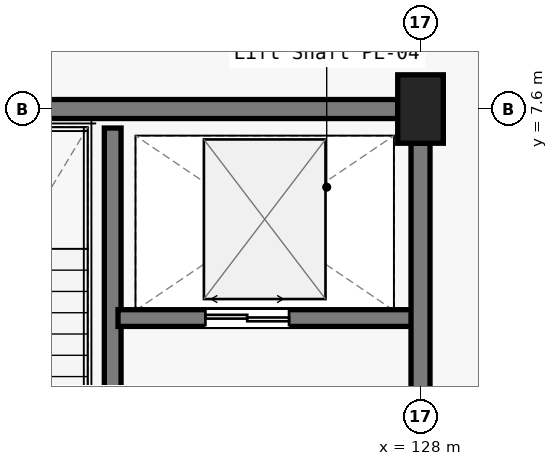
"""IFC4 building model, lengths in metres.
Left out: names, types, materials, properties, quantities, classifications, styles, units other than length and angle.
Written with IfcOpenShell. Run it as: python <this file> out.ifc"""

import sys

from ifc_helpers import new_model, si_unit, direction, frame, frame_2d, origin, origin_2d, place, context, subcontext, project, spatial, rectangle, extrude, element, fill, save


model = new_model("IFC4")
c1 = context("Model", 3, precision=1e-05, world=origin(), true_north=direction((0.0, 1.0)))
c2 = subcontext(c1, "Body", "Model", "MODEL_VIEW")
j1 = project(units=[si_unit("LENGTHUNIT", "METRE"), si_unit("PLANEANGLEUNIT", "RADIAN")], contexts=[c1])
p1 = place(None, origin())
s1 = spatial("IfcSite", under=j1, at=p1, CompositionType="ELEMENT")
p2 = place(p1, origin())
s2 = spatial("IfcBuilding", under=s1, at=p2, CompositionType="ELEMENT")
p3 = place(p2, origin())
s3 = spatial("IfcBuildingStorey", under=s2, at=p3, CompositionType="ELEMENT", Elevation=0.0)
p4 = place(p3, frame((128.0, 7.6, 0.0), z_axis=(0.0, 0.0, 1.0), x_axis=(1.0, 0.0, 0.0)))
e1 = element("IfcColumn", 1, at=p4, inside=s3, PredefinedType="COLUMN", context=c2, shape_type="SweptSolid", body=[
    extrude(rectangle(XDim=0.6, YDim=0.9, at=origin_2d()), origin(), (0.0, 0.0, 1.0), 5.4),
])
p5 = place(p3, frame((120.35, 7.6, 0.0), z_axis=(0.0, 0.0, 1.0), x_axis=(1.0, 0.0, 0.0)))
e2 = element("IfcWall", 2, at=p5, inside=s3, PredefinedType="SOLIDWALL", context=c2, shape_type="SweptSolid", body=[
    extrude(rectangle(XDim=7.35, YDim=0.25, at=frame_2d((3.675, 0.0))), origin(), (0.0, 0.0, 1.0), 3.29),
])
p6 = place(p3, frame((123.95, 0.25, 0.0), z_axis=(0.0, 0.0, 1.0), x_axis=(0.0, 1.0, 0.0)))
e3 = element("IfcWall", 3, at=p6, inside=s3, PredefinedType="SOLIDWALL", context=c2, shape_type="SweptSolid", body=[
    extrude(rectangle(XDim=7.1, YDim=0.22, at=frame_2d((3.55, 0.0))), origin(), (0.0, 0.0, 1.0), 5.1),
])
p7 = place(p6, frame((0.35, 0.0, 0.0)))
e4 = element("IfcOpeningElement", 4, at=p7, cuts=e3, PredefinedType="OPENING", context=c2, shape_type="SweptSolid", body=[
    extrude(rectangle(XDim=1.2, YDim=2.15, at=frame_2d((0.6, 1.075))), frame((0.0, 0.12, 0.0), z_axis=(0.0, -1.0, 0.0), x_axis=(1.0, 0.0, 0.0)), (0.0, 0.0, 1.0), 0.24),
])
p8 = place(p3, frame((124.02, 4.85, 0.0), z_axis=(0.0, 0.0, 1.0), x_axis=(1.0, 0.0, 0.0)))
e5 = element("IfcWall", 5, at=p8, inside=s3, PredefinedType="SOLIDWALL", context=c2, shape_type="SweptSolid", body=[
    extrude(rectangle(XDim=3.93, YDim=0.22, at=frame_2d((1.965, 0.0))), origin(), (0.0, 0.0, 1.0), 4.4),
])
p9 = place(p8, frame((1.15, 0.0, 0.0)))
e6 = element("IfcOpeningElement", 6, at=p9, cuts=e5, PredefinedType="OPENING", context=c2, shape_type="SweptSolid", body=[
    extrude(rectangle(XDim=1.1, YDim=2.2, at=frame_2d((0.55, 1.1))), frame((0.0, 0.12, 0.0), z_axis=(0.0, -1.0, 0.0), x_axis=(1.0, 0.0, 0.0)), (0.0, 0.0, 1.0), 0.24),
])
p10 = place(p3, frame((128.0, 0.35, 0.0), z_axis=(0.0, 0.0, 1.0), x_axis=(0.0, 1.0, 0.0)))
e7 = element("IfcWall", 7, at=p10, inside=s3, PredefinedType="SOLIDWALL", context=c2, shape_type="SweptSolid", body=[
    extrude(rectangle(XDim=6.8, YDim=0.25, at=frame_2d((3.4, 0.0))), origin(), (0.0, 0.0, 1.0), 4.325),
])
p11 = place(p10, frame((2.0, 0.0, 0.0)))
e8 = element("IfcOpeningElement", 8, at=p11, cuts=e7, PredefinedType="OPENING", context=c2, shape_type="SweptSolid", body=[
    extrude(rectangle(XDim=1.35, YDim=2.2, at=frame_2d((0.675, 1.1))), frame((0.0, 0.135, 0.0), z_axis=(0.0, -1.0, 0.0), x_axis=(1.0, 0.0, 0.0)), (0.0, 0.0, 1.0), 0.27),
])
p12 = place(p9, origin())
e9 = element("IfcDoor", 9, at=p12, inside=s3, OperationType="DOUBLE_DOOR_SLIDING", PredefinedType="DOOR", context=c2, shape_type="SweptSolid", body=[
    extrude(rectangle(XDim=1.1, YDim=2.2, at=frame_2d((0.55, 1.1))), frame((0.0, 0.025, 0.0), z_axis=(0.0, -1.0, 0.0), x_axis=(1.0, 0.0, 0.0)), (0.0, 0.0, 1.0), 0.05),
])
fill(e6, e9)
save(model, sys.argv[1])
